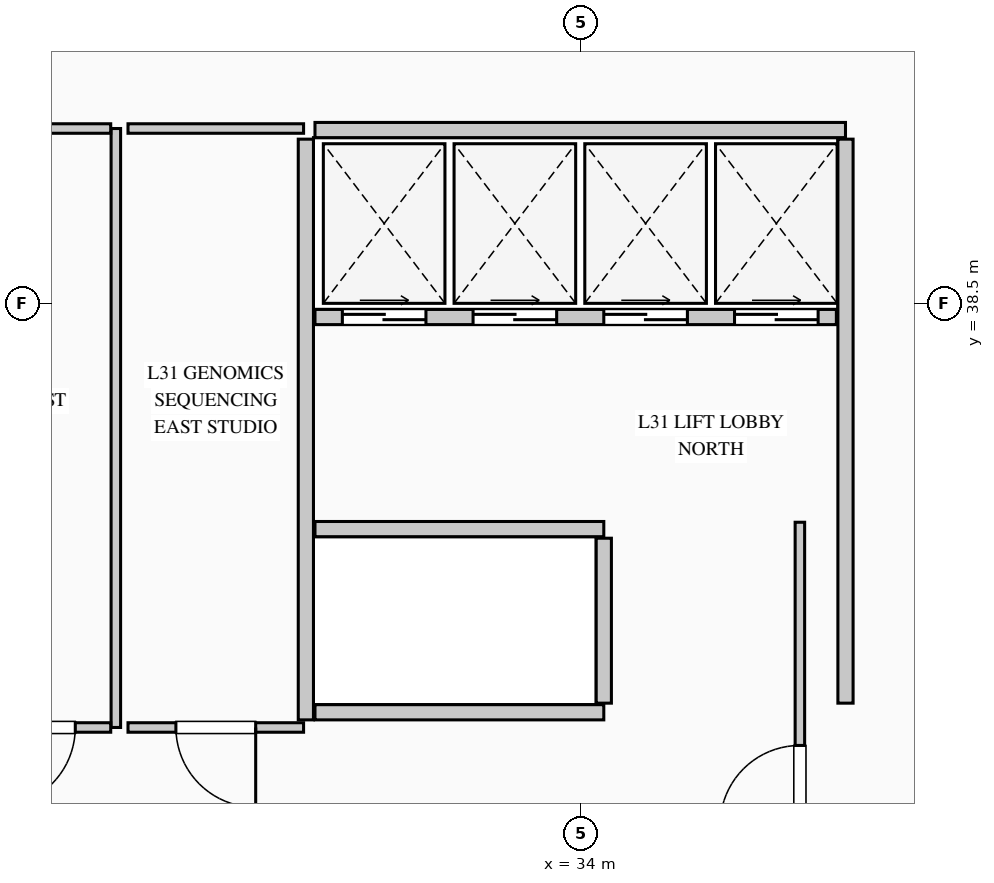
"""IFC4 building model, lengths in metres.
Left out: names, types, materials, properties, quantities, classifications, styles, units other than length and angle.
Written with IfcOpenShell. Run it as: python <this file> out.ifc"""

import sys

from ifc_helpers import new_model, si_unit, direction, frame, frame_2d, origin, place, context, subcontext, project, spatial, rectangle, extrude, element, fill, save


model = new_model("IFC4")
c1 = context("Model", 3, precision=1e-05, world=origin(), true_north=direction((0.0, 1.0)))
c2 = subcontext(c1, "Body", "Model", "MODEL_VIEW")
j1 = project(units=[si_unit("LENGTHUNIT", "METRE"), si_unit("PLANEANGLEUNIT", "RADIAN")], contexts=[c1])
p1 = place(None, origin())
s1 = spatial("IfcSite", under=j1, at=p1, CompositionType="ELEMENT")
p2 = place(p1, origin())
s2 = spatial("IfcBuilding", under=s1, at=p2, CompositionType="ELEMENT")
p3 = place(p2, frame((0.0, 0.0, 135.1)))
s3 = spatial("IfcBuildingStorey", under=s2, at=p3, CompositionType="ELEMENT", Elevation=135.1)
p4 = place(p3, frame((30.38, 33.02, 0.0), z_axis=(0.0, 0.0, 1.0), x_axis=(0.0, 1.0, 0.0)))
e1 = element("IfcWall", 1, at=p4, inside=s3, PredefinedType="PARTITIONING", context=c2, shape_type="SweptSolid", body=[
    extrude(rectangle(XDim=7.64, YDim=0.2, at=frame_2d((3.82, 0.0))), origin(), (0.0, 0.0, 1.0), 3.69),
])
p5 = place(p3, frame((30.5, 40.78, 0.0), z_axis=(0.0, 0.0, 1.0), x_axis=(1.0, 0.0, 0.0)))
e2 = element("IfcWall", 2, at=p5, inside=s3, PredefinedType="PARTITIONING", context=c2, shape_type="SweptSolid", body=[
    extrude(rectangle(XDim=6.98, YDim=0.2, at=frame_2d((3.49, 0.0))), origin(), (0.0, 0.0, 1.0), 3.69),
])
p6 = place(p3, frame((37.48, 33.24, 0.0), z_axis=(0.0, 0.0, 1.0), x_axis=(0.0, 1.0, 0.0)))
e3 = element("IfcWall", 3, at=p6, inside=s3, PredefinedType="PARTITIONING", context=c2, shape_type="SweptSolid", body=[
    extrude(rectangle(XDim=7.42, YDim=0.2, at=frame_2d((3.71, 0.0))), origin(), (0.0, 0.0, 1.0), 3.69),
])
p7 = place(p3, frame((30.5, 38.32, 0.0), z_axis=(0.0, 0.0, 1.0), x_axis=(1.0, 0.0, 0.0)))
e4 = element("IfcWall", 4, at=p7, inside=s3, PredefinedType="PARTITIONING", context=c2, shape_type="SweptSolid", body=[
    extrude(rectangle(XDim=6.86, YDim=0.2, at=frame_2d((3.43, 0.0))), origin(), (0.0, 0.0, 1.0), 3.69),
])
p8 = place(p7, frame((0.36, 0.0, 0.0)))
e5 = element("IfcOpeningElement", 5, at=p8, cuts=e4, PredefinedType="OPENING", context=c2, shape_type="SweptSolid", body=[
    extrude(rectangle(XDim=1.1, YDim=2.2, at=frame_2d((0.55, 1.1))), frame((0.0, 0.11, 0.0), z_axis=(0.0, -1.0, 0.0), x_axis=(1.0, 0.0, 0.0)), (0.0, 0.0, 1.0), 0.22),
])
p9 = place(p7, frame((2.08, 0.0, 0.0)))
e6 = element("IfcOpeningElement", 6, at=p9, cuts=e4, PredefinedType="OPENING", context=c2, shape_type="SweptSolid", body=[
    extrude(rectangle(XDim=1.1, YDim=2.2, at=frame_2d((0.55, 1.1))), frame((0.0, 0.11, 0.0), z_axis=(0.0, -1.0, 0.0), x_axis=(1.0, 0.0, 0.0)), (0.0, 0.0, 1.0), 0.22),
])
p10 = place(p7, frame((3.8, 0.0, 0.0)))
e7 = element("IfcOpeningElement", 7, at=p10, cuts=e4, PredefinedType="OPENING", context=c2, shape_type="SweptSolid", body=[
    extrude(rectangle(XDim=1.1, YDim=2.2, at=frame_2d((0.55, 1.1))), frame((0.0, 0.11, 0.0), z_axis=(0.0, -1.0, 0.0), x_axis=(1.0, 0.0, 0.0)), (0.0, 0.0, 1.0), 0.22),
])
p11 = place(p7, frame((5.52, 0.0, 0.0)))
e8 = element("IfcOpeningElement", 8, at=p11, cuts=e4, PredefinedType="OPENING", context=c2, shape_type="SweptSolid", body=[
    extrude(rectangle(XDim=1.1, YDim=2.2, at=frame_2d((0.55, 1.1))), frame((0.0, 0.11, 0.0), z_axis=(0.0, -1.0, 0.0), x_axis=(1.0, 0.0, 0.0)), (0.0, 0.0, 1.0), 0.22),
])
for number, where, z_axis, x_axis in (
    (9, (30.5, 35.53, 0.0), (0.0, 0.0, 1.0), (1.0, 0.0, 0.0)),
    (10, (30.5, 33.12, 0.0), (0.0, 0.0, 1.0), (1.0, 0.0, 0.0)),
):
    element("IfcWall", number, at=place(p3, frame(where, z_axis=z_axis, x_axis=x_axis)), inside=s3, PredefinedType="PARTITIONING", context=c2, shape_type="SweptSolid", body=[
        extrude(rectangle(XDim=3.8, YDim=0.2, at=frame_2d((1.9, 0.0))), origin(), (0.0, 0.0, 1.0), 3.69),
    ])
p12 = place(p3, frame((34.3, 33.24, 0.0), z_axis=(0.0, 0.0, 1.0), x_axis=(0.0, 1.0, 0.0)))
e11 = element("IfcWall", 11, at=p12, inside=s3, PredefinedType="PARTITIONING", context=c2, shape_type="SweptSolid", body=[
    extrude(rectangle(XDim=2.17, YDim=0.2, at=frame_2d((1.085, 0.0))), origin(), (0.0, 0.0, 1.0), 3.69),
])
p13 = place(p3, frame((27.88, 40.8, 0.0), z_axis=(0.0, 0.0, 1.0), x_axis=(0.0, -1.0, 0.0)))
e12 = element("IfcWall", 12, at=p13, inside=s3, PredefinedType="PARTITIONING", context=c2, shape_type="SweptSolid", body=[
    extrude(rectangle(XDim=7.88, YDim=0.125, at=frame_2d((3.94, 0.0))), origin(), (0.0, 0.0, 1.0), 3.69),
])
p14 = place(p3, frame((27.812, 32.92, 0.0), z_axis=(0.0, 0.0, 1.0), x_axis=(-1.0, 0.0, 0.0)))
e13 = element("IfcWall", 13, at=p14, inside=s3, PredefinedType="PARTITIONING", context=c2, shape_type="SweptSolid", body=[
    extrude(rectangle(XDim=3.762, YDim=0.125, at=frame_2d((1.881, 0.0))), origin(), (0.0, 0.0, 1.0), 3.69),
])
p15 = place(p14, frame((0.466, 0.0, 0.0)))
e14 = element("IfcOpeningElement", 14, at=p15, cuts=e13, PredefinedType="OPENING", context=c2, shape_type="SweptSolid", body=[
    extrude(rectangle(XDim=1.05, YDim=2.15, at=frame_2d((0.525, 1.075))), frame((0.0, 0.073, 0.0), z_axis=(0.0, -1.0, 0.0), x_axis=(1.0, 0.0, 0.0)), (0.0, 0.0, 1.0), 0.145),
])
p16 = place(p3, frame((24.117, 40.8, 0.0), z_axis=(0.0, 0.0, 1.0), x_axis=(1.0, 0.0, 0.0)))
e15 = element("IfcWall", 15, at=p16, inside=s3, PredefinedType="PARTITIONING", context=c2, shape_type="SweptSolid", body=[
    extrude(rectangle(XDim=3.695, YDim=0.125, at=frame_2d((1.848, 0.0))), origin(), (0.0, 0.0, 1.0), 3.69),
])
p17 = place(p3, frame((30.35, 32.92, 0.0), z_axis=(0.0, 0.0, 1.0), x_axis=(-1.0, 0.0, 0.0)))
e16 = element("IfcWall", 16, at=p17, inside=s3, PredefinedType="PARTITIONING", context=c2, shape_type="SweptSolid", body=[
    extrude(rectangle(XDim=2.31, YDim=0.125, at=frame_2d((1.155, 0.0))), origin(), (0.0, 0.0, 1.0), 3.69),
])
p18 = place(p17, frame((0.63, 0.0, 0.0)))
e17 = element("IfcOpeningElement", 17, at=p18, cuts=e16, PredefinedType="OPENING", context=c2, shape_type="SweptSolid", body=[
    extrude(rectangle(XDim=1.05, YDim=2.15, at=frame_2d((0.525, 1.075))), frame((0.0, 0.073, 0.0), z_axis=(0.0, -1.0, 0.0), x_axis=(1.0, 0.0, 0.0)), (0.0, 0.0, 1.0), 0.145),
])
p19 = place(p3, frame((28.04, 40.8, 0.0), z_axis=(0.0, 0.0, 1.0), x_axis=(1.0, 0.0, 0.0)))
e18 = element("IfcWall", 18, at=p19, inside=s3, PredefinedType="PARTITIONING", context=c2, shape_type="SweptSolid", body=[
    extrude(rectangle(XDim=2.31, YDim=0.125, at=frame_2d((1.155, 0.0))), origin(), (0.0, 0.0, 1.0), 3.69),
])
p20 = place(p3, frame((36.88, 28.698, 0.0), z_axis=(0.0, 0.0, 1.0), x_axis=(0.0, 1.0, 0.0)))
e19 = element("IfcWall", 19, at=p20, inside=s3, PredefinedType="PARTITIONING", context=c2, shape_type="SweptSolid", body=[
    extrude(rectangle(XDim=6.923, YDim=0.125, at=frame_2d((3.461, 0.0))), origin(), (0.0, 0.0, 1.0), 3.69),
])
p21 = place(p20, frame((2.936, 0.0, 0.0)))
e20 = element("IfcOpeningElement", 20, at=p21, cuts=e19, PredefinedType="OPENING", context=c2, shape_type="SweptSolid", body=[
    extrude(rectangle(XDim=1.05, YDim=2.15, at=frame_2d((0.525, 1.075))), frame((0.0, 0.073, 0.0), z_axis=(0.0, -1.0, 0.0), x_axis=(1.0, 0.0, 0.0)), (0.0, 0.0, 1.0), 0.145),
])
p22 = place(p8, origin())
e21 = element("IfcDoor", 21, at=p22, inside=s3, OperationType="DOUBLE_DOOR_SLIDING", PredefinedType="DOOR", context=c2, shape_type="SweptSolid", body=[
    extrude(rectangle(XDim=1.1, YDim=2.2, at=frame_2d((0.55, 1.1))), frame((0.0, 0.025, 0.0), z_axis=(0.0, -1.0, 0.0), x_axis=(1.0, 0.0, 0.0)), (0.0, 0.0, 1.0), 0.05),
])
fill(e5, e21)
p23 = place(p9, origin())
e22 = element("IfcDoor", 22, at=p23, inside=s3, OperationType="DOUBLE_DOOR_SLIDING", PredefinedType="DOOR", context=c2, shape_type="SweptSolid", body=[
    extrude(rectangle(XDim=1.1, YDim=2.2, at=frame_2d((0.55, 1.1))), frame((0.0, 0.025, 0.0), z_axis=(0.0, -1.0, 0.0), x_axis=(1.0, 0.0, 0.0)), (0.0, 0.0, 1.0), 0.05),
])
fill(e6, e22)
p24 = place(p10, origin())
e23 = element("IfcDoor", 23, at=p24, inside=s3, OperationType="DOUBLE_DOOR_SLIDING", PredefinedType="DOOR", context=c2, shape_type="SweptSolid", body=[
    extrude(rectangle(XDim=1.1, YDim=2.2, at=frame_2d((0.55, 1.1))), frame((0.0, 0.025, 0.0), z_axis=(0.0, -1.0, 0.0), x_axis=(1.0, 0.0, 0.0)), (0.0, 0.0, 1.0), 0.05),
])
fill(e7, e23)
p25 = place(p11, origin())
e24 = element("IfcDoor", 24, at=p25, inside=s3, OperationType="DOUBLE_DOOR_SLIDING", PredefinedType="DOOR", context=c2, shape_type="SweptSolid", body=[
    extrude(rectangle(XDim=1.1, YDim=2.2, at=frame_2d((0.55, 1.1))), frame((0.0, 0.025, 0.0), z_axis=(0.0, -1.0, 0.0), x_axis=(1.0, 0.0, 0.0)), (0.0, 0.0, 1.0), 0.05),
])
fill(e8, e24)
p26 = place(p15, origin())
e25 = element("IfcDoor", 25, at=p26, inside=s3, OperationType="SINGLE_SWING_RIGHT", PredefinedType="DOOR", context=c2, shape_type="SweptSolid", body=[
    extrude(rectangle(XDim=1.05, YDim=2.15, at=frame_2d((0.525, 1.075))), frame((0.0, 0.025, 0.0), z_axis=(0.0, -1.0, 0.0), x_axis=(1.0, 0.0, 0.0)), (0.0, 0.0, 1.0), 0.05),
])
fill(e14, e25)
p27 = place(p18, origin())
e26 = element("IfcDoor", 26, at=p27, inside=s3, OperationType="SINGLE_SWING_LEFT", PredefinedType="DOOR", context=c2, shape_type="SweptSolid", body=[
    extrude(rectangle(XDim=1.05, YDim=2.15, at=frame_2d((0.525, 1.075))), frame((0.0, 0.025, 0.0), z_axis=(0.0, -1.0, 0.0), x_axis=(1.0, 0.0, 0.0)), (0.0, 0.0, 1.0), 0.05),
])
fill(e17, e26)
p28 = place(p21, origin())
e27 = element("IfcDoor", 27, at=p28, inside=s3, OperationType="SINGLE_SWING_LEFT", PredefinedType="DOOR", context=c2, shape_type="SweptSolid", body=[
    extrude(rectangle(XDim=1.05, YDim=2.15, at=frame_2d((0.525, 1.075))), frame((0.0, 0.025, 0.0), z_axis=(0.0, -1.0, 0.0), x_axis=(1.0, 0.0, 0.0)), (0.0, 0.0, 1.0), 0.05),
])
fill(e20, e27)
save(model, sys.argv[1])
